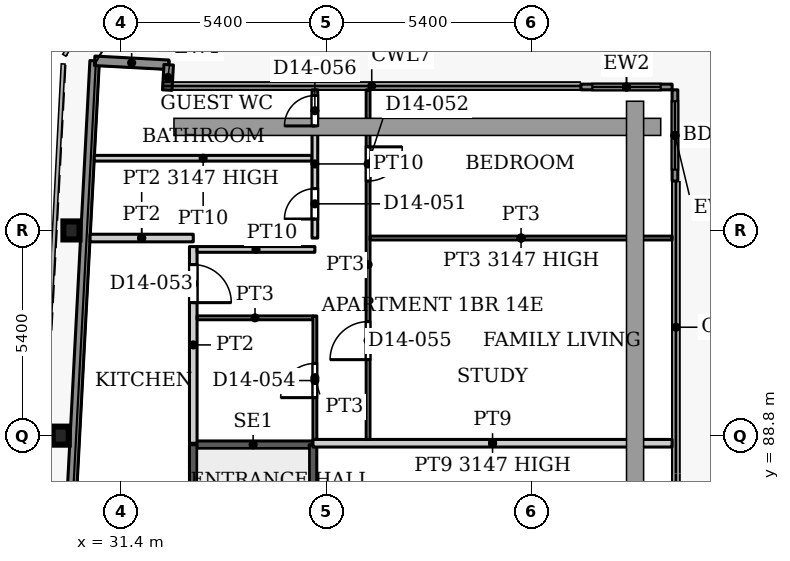
"""IFC4 building model, lengths in metres.
Left out: names, types, materials, properties, quantities, classifications, styles, units other than length and angle.
Written with IfcOpenShell. Run it as: python <this file> out.ifc"""

import sys

from ifc_helpers import new_model, si_unit, direction, frame, frame_2d, origin, origin_2d, place, context, subcontext, project, spatial, rectangle, i_section, extrude, source, transform, mapped, element, fill, save


model = new_model("IFC4")
c1 = context("Model", 3, precision=1e-05, world=origin(), true_north=direction((0.0, 1.0)))
c2 = subcontext(c1, "Body", "Model", "MODEL_VIEW")
j1 = project(units=[si_unit("LENGTHUNIT", "METRE"), si_unit("PLANEANGLEUNIT", "RADIAN")], contexts=[c1])
p1 = place(None, origin())
s1 = spatial("IfcSite", under=j1, at=p1, CompositionType="ELEMENT")
p2 = place(p1, origin())
s2 = spatial("IfcBuilding", under=s1, at=p2, CompositionType="ELEMENT")
p3 = place(p2, frame((0.0, 0.0, 61.7)))
s3 = spatial("IfcBuildingStorey", under=s2, at=p3, CompositionType="ELEMENT", Elevation=61.7)
for number, where, z_axis, x_axis in (
    (1, (29.811, 88.8, 0.0), (0.0, 0.0, 1.0), (1.0, 0.0, 0.0)),
    (2, (30.095, 94.2, 0.0), (0.0, 0.0, 1.0), (1.0, 0.0, 0.0)),
):
    element("IfcColumn", number, at=place(p3, frame(where, z_axis=z_axis, x_axis=x_axis)), inside=s3, PredefinedType="COLUMN", context=c2, shape_type="SweptSolid", body=[
        extrude(i_section(OverallWidth=0.424, OverallDepth=0.474, WebThickness=0.048, FlangeThickness=0.077, FilletRadius=0.014, at=origin_2d()), origin(), (0.0, 0.0, 1.0), 3.9),
    ])
p4 = place(p3, frame((27.195, 31.969, 0.0), z_axis=(0.0, 0.0, 1.0), x_axis=(0.052554995867, 0.998618031286, 0.0)))
e3 = element("IfcWall", 3, at=p4, inside=s3, PredefinedType="SOLIDWALL", context=c2, shape_type="SweptSolid", body=[
    extrude(rectangle(XDim=66.787, YDim=0.25, at=frame_2d((33.394, 0.0))), origin(), (0.0, 0.0, 1.0), 3.75),
])
p5 = place(p3, frame((30.705, 98.664, 0.0), z_axis=(0.0, 0.0, 1.0), x_axis=(0.998577785791, -0.053314216913, 0.0)))
e4 = element("IfcWall", 4, at=p5, inside=s3, PredefinedType="SOLIDWALL", context=c2, shape_type="SweptSolid", body=[
    extrude(rectangle(XDim=1.951, YDim=0.25, at=frame_2d((0.975, 0.0))), origin(), (0.0, 0.0, 1.0), 3.75),
])
p6 = place(p3, frame((32.653, 98.56, 0.0), z_axis=(0.0, 0.0, 1.0), x_axis=(-0.054093451632, -0.998535877418, 0.0)))
e5 = element("IfcWall", 5, at=p6, inside=s3, PredefinedType="SOLIDWALL", context=c2, shape_type="SweptSolid", body=[
    extrude(rectangle(XDim=0.668, YDim=0.25, at=frame_2d((0.334, 0.0))), origin(), (0.0, 0.0, 1.0), 3.75),
])
p7 = place(p3, frame((43.5, 97.975, 0.0), z_axis=(0.0, 0.0, 1.0), x_axis=(1.0, 0.0, 0.0)))
e6 = element("IfcWall", 6, at=p7, inside=s3, PredefinedType="SOLIDWALL", context=c2, shape_type="SweptSolid", body=[
    extrude(rectangle(XDim=2.4, YDim=0.15, at=frame_2d((1.2, 0.0))), origin(), (0.0, 0.0, 1.0), 3.75),
])
p8 = place(p7, frame((0.3, 0.0, 0.0)))
e7 = element("IfcOpeningElement", 7, at=p8, cuts=e6, PredefinedType="OPENING", context=c2, shape_type="SweptSolid", body=[
    extrude(rectangle(XDim=1.8, YDim=2.4, at=frame_2d((0.9, 1.2))), frame((0.0, 0.085, 0.0), z_axis=(0.0, -1.0, 0.0), x_axis=(1.0, 0.0, 0.0)), (0.0, 0.0, 1.0), 0.17),
])
p9 = place(p3, frame((45.975, 97.9, 0.0), z_axis=(0.0, 0.0, 1.0), x_axis=(0.0, -1.0, 0.0)))
e8 = element("IfcWall", 8, at=p9, inside=s3, PredefinedType="SOLIDWALL", context=c2, shape_type="SweptSolid", body=[
    extrude(rectangle(XDim=2.4, YDim=0.15, at=frame_2d((1.2, 0.0))), origin(), (0.0, 0.0, 1.0), 3.75),
])
p10 = place(p9, frame((0.3, 0.0, 0.0)))
e9 = element("IfcOpeningElement", 9, at=p10, cuts=e8, PredefinedType="OPENING", context=c2, shape_type="SweptSolid", body=[
    extrude(rectangle(XDim=1.8, YDim=2.4, at=frame_2d((0.9, 1.2))), frame((0.0, 0.085, 0.0), z_axis=(0.0, -1.0, 0.0), x_axis=(1.0, 0.0, 0.0)), (0.0, 0.0, 1.0), 0.17),
])
p11 = place(p3, frame((33.3, 88.56, 0.0), z_axis=(0.0, 0.0, 1.0), x_axis=(1.0, 0.0, 0.0)))
e10 = element("IfcWall", 10, at=p11, inside=s3, PredefinedType="SHEAR", context=c2, shape_type="SweptSolid", body=[
    extrude(rectangle(XDim=3.15, YDim=0.2, at=frame_2d((1.575, 0.0))), origin(), (0.0, 0.0, 1.0), 3.9),
])
p12 = place(p3, frame((33.3, 79.4, 0.0), z_axis=(0.0, 0.0, 1.0), x_axis=(0.0, 1.0, 0.0)))
e11 = element("IfcWall", 11, at=p12, inside=s3, PredefinedType="SHEAR", context=c2, shape_type="SweptSolid", body=[
    extrude(rectangle(XDim=9.16, YDim=0.2, at=frame_2d((4.58, 0.0))), origin(), (0.0, 0.0, 1.0), 3.9),
])
p13 = place(p12, frame((0.35, 0.0, 0.0)))
e12 = element("IfcOpeningElement", 12, at=p13, cuts=e11, PredefinedType="OPENING", context=c2, shape_type="SweptSolid", body=[
    extrude(rectangle(XDim=1.1, YDim=2.2, at=frame_2d((0.55, 1.1))), frame((0.0, 0.11, 0.0), z_axis=(0.0, -1.0, 0.0), x_axis=(1.0, 0.0, 0.0)), (0.0, 0.0, 1.0), 0.22),
])
p14 = place(p3, frame((36.45, 79.4, 0.0), z_axis=(0.0, 0.0, 1.0), x_axis=(0.0, 1.0, 0.0)))
e13 = element("IfcWall", 13, at=p14, inside=s3, PredefinedType="SHEAR", context=c2, shape_type="SweptSolid", body=[
    extrude(rectangle(XDim=9.16, YDim=0.2, at=frame_2d((4.58, 0.0))), origin(), (0.0, 0.0, 1.0), 3.9),
])
p15 = place(p3, frame((30.695, 96.1, 0.0), z_axis=(0.0, 0.0, 1.0), x_axis=(1.0, 0.0, 0.0)))
e14 = element("IfcWall", 14, at=p15, inside=s3, PredefinedType="PARTITIONING", context=c2, shape_type="SweptSolid", body=[
    extrude(rectangle(XDim=5.73, YDim=0.15, at=frame_2d((2.865, 0.0))), origin(), (0.0, 0.0, 1.0), 3.6),
])
p16 = place(p3, frame((30.585, 94.0, 0.0), z_axis=(0.0, 0.0, 1.0), x_axis=(1.0, 0.0, 0.0)))
e15 = element("IfcWall", 15, at=p16, inside=s3, PredefinedType="PARTITIONING", context=c2, shape_type="SweptSolid", body=[
    extrude(rectangle(XDim=2.715, YDim=0.2, at=frame_2d((1.358, 0.0))), origin(), (0.0, 0.0, 1.0), 3.147),
])
p17 = place(p3, frame((33.3, 88.6, 0.0), z_axis=(0.0, 0.0, 1.0), x_axis=(0.0, 1.0, 0.0)))
e16 = element("IfcWall", 16, at=p17, inside=s3, PredefinedType="PARTITIONING", context=c2, shape_type="SweptSolid", body=[
    extrude(rectangle(XDim=5.175, YDim=0.2, at=frame_2d((2.587, 0.0))), origin(), (0.0, 0.0, 1.0), 3.6),
])
p18 = place(p17, frame((3.7, 0.0, 0.0)))
e17 = element("IfcOpeningElement", 17, at=p18, cuts=e16, PredefinedType="OPENING", context=c2, shape_type="SweptSolid", body=[
    extrude(rectangle(XDim=1.0, YDim=2.1, at=frame_2d((0.5, 1.05))), frame((0.0, 0.11, 0.0), z_axis=(0.0, -1.0, 0.0), x_axis=(1.0, 0.0, 0.0)), (0.0, 0.0, 1.0), 0.22),
])
p19 = place(p3, frame((33.4, 91.9, 0.0), z_axis=(0.0, 0.0, 1.0), x_axis=(1.0, 0.0, 0.0)))
e18 = element("IfcWall", 18, at=p19, inside=s3, PredefinedType="PARTITIONING", context=c2, shape_type="SweptSolid", body=[
    extrude(rectangle(XDim=3.05, YDim=0.1, at=frame_2d((1.525, 0.0))), origin(), (0.0, 0.0, 1.0), 3.6),
])
p20 = place(p3, frame((33.4, 93.7, 0.0), z_axis=(0.0, 0.0, 1.0), x_axis=(1.0, 0.0, 0.0)))
e19 = element("IfcWall", 19, at=p20, inside=s3, PredefinedType="PARTITIONING", context=c2, shape_type="SweptSolid", body=[
    extrude(rectangle(XDim=3.1, YDim=0.15, at=frame_2d((1.55, 0.0))), origin(), (0.0, 0.0, 1.0), 3.6),
])
p21 = place(p3, frame((36.45, 88.6, 0.0), z_axis=(0.0, 0.0, 1.0), x_axis=(1.0, 0.0, 0.0)))
e20 = element("IfcWall", 20, at=p21, inside=s3, PredefinedType="PARTITIONING", context=c2, shape_type="SweptSolid", body=[
    extrude(rectangle(XDim=9.45, YDim=0.2, at=frame_2d((4.725, 0.0))), origin(), (0.0, 0.0, 1.0), 3.147),
])
p22 = place(p3, frame((36.5, 88.7, 0.0), z_axis=(0.0, 0.0, 1.0), x_axis=(0.0, 1.0, 0.0)))
e21 = element("IfcWall", 21, at=p22, inside=s3, PredefinedType="PARTITIONING", context=c2, shape_type="SweptSolid", body=[
    extrude(rectangle(XDim=3.25, YDim=0.1, at=frame_2d((1.625, 0.0))), origin(), (0.0, 0.0, 1.0), 3.6),
])
p23 = place(p22, frame((1.1, 0.0, 0.0)))
e22 = element("IfcOpeningElement", 22, at=p23, cuts=e21, PredefinedType="OPENING", context=c2, shape_type="SweptSolid", body=[
    extrude(rectangle(XDim=0.9, YDim=2.1, at=frame_2d((0.45, 1.05))), frame((0.0, 0.06, 0.0), z_axis=(0.0, -1.0, 0.0), x_axis=(1.0, 0.0, 0.0)), (0.0, 0.0, 1.0), 0.12),
])
p24 = place(p3, frame((36.5, 94.0, 0.0), z_axis=(0.0, 0.0, 1.0), x_axis=(0.0, 1.0, 0.0)))
e23 = element("IfcWall", 23, at=p24, inside=s3, PredefinedType="PARTITIONING", context=c2, shape_type="SweptSolid", body=[
    extrude(rectangle(XDim=3.9, YDim=0.15, at=frame_2d((1.95, 0.0))), origin(), (0.0, 0.0, 1.0), 3.6),
])
p25 = place(p24, frame((0.5, 0.0, 0.0)))
e24 = element("IfcOpeningElement", 24, at=p25, cuts=e23, PredefinedType="OPENING", context=c2, shape_type="SweptSolid", body=[
    extrude(rectangle(XDim=0.8, YDim=2.1, at=frame_2d((0.4, 1.05))), frame((0.0, 0.085, 0.0), z_axis=(0.0, -1.0, 0.0), x_axis=(1.0, 0.0, 0.0)), (0.0, 0.0, 1.0), 0.17),
])
p26 = place(p24, frame((2.95, 0.0, 0.0)))
e25 = element("IfcOpeningElement", 25, at=p26, cuts=e23, PredefinedType="OPENING", context=c2, shape_type="SweptSolid", body=[
    extrude(rectangle(XDim=0.8, YDim=2.1, at=frame_2d((0.4, 1.05))), frame((0.0, 0.085, 0.0), z_axis=(0.0, -1.0, 0.0), x_axis=(1.0, 0.0, 0.0)), (0.0, 0.0, 1.0), 0.17),
])
p27 = place(p3, frame((37.9, 88.7, 0.0), z_axis=(0.0, 0.0, 1.0), x_axis=(0.0, 1.0, 0.0)))
e26 = element("IfcWall", 26, at=p27, inside=s3, PredefinedType="PARTITIONING", context=c2, shape_type="SweptSolid", body=[
    extrude(rectangle(XDim=9.2, YDim=0.1, at=frame_2d((4.6, 0.0))), origin(), (0.0, 0.0, 1.0), 3.6),
])
p28 = place(p27, frame((6.8, 0.0, 0.0)))
e27 = element("IfcOpeningElement", 27, at=p28, cuts=e26, PredefinedType="OPENING", context=c2, shape_type="SweptSolid", body=[
    extrude(rectangle(XDim=0.9, YDim=2.1, at=frame_2d((0.45, 1.05))), frame((0.0, 0.06, 0.0), z_axis=(0.0, -1.0, 0.0), x_axis=(1.0, 0.0, 0.0)), (0.0, 0.0, 1.0), 0.12),
])
p29 = place(p27, frame((2.1, 0.0, 0.0)))
e28 = element("IfcOpeningElement", 28, at=p29, cuts=e26, PredefinedType="OPENING", context=c2, shape_type="SweptSolid", body=[
    extrude(rectangle(XDim=1.0, YDim=2.1, at=frame_2d((0.5, 1.05))), frame((0.0, 0.06, 0.0), z_axis=(0.0, -1.0, 0.0), x_axis=(1.0, 0.0, 0.0)), (0.0, 0.0, 1.0), 0.12),
])
p30 = place(p3, frame((37.95, 94.0, 0.0), z_axis=(0.0, 0.0, 1.0), x_axis=(1.0, 0.0, 0.0)))
e29 = element("IfcWall", 29, at=p30, inside=s3, PredefinedType="PARTITIONING", context=c2, shape_type="SweptSolid", body=[
    extrude(rectangle(XDim=7.95, YDim=0.1, at=frame_2d((3.975, 0.0))), origin(), (0.0, 0.0, 1.0), 3.147),
])
m1 = source(origin(), c2, "Body", "SweptSolid", [
    extrude(rectangle(XDim=1.8, YDim=2.4, at=frame_2d((0.9, 1.2))), frame((0.0, 0.025, 0.0), z_axis=(0.0, -1.0, 0.0), x_axis=(1.0, 0.0, 0.0)), (0.0, 0.0, 1.0), 0.05),
])
p31 = place(p8, origin())
e30 = element("IfcDoor", 30, at=p31, inside=s3, OperationType="SLIDING_TO_LEFT", PredefinedType="DOOR", context=c2, shape_type="MappedRepresentation", body=[
    mapped(m1, transform((0.0, 0.0, 0.0), x_axis=(1.0, 0.0, 0.0), y_axis=(0.0, 1.0, 0.0), z_axis=(0.0, 0.0, 1.0), scale=1.0)),
])
fill(e7, e30)
p32 = place(p10, origin())
e31 = element("IfcDoor", 31, at=p32, inside=s3, OperationType="SLIDING_TO_LEFT", PredefinedType="DOOR", context=c2, shape_type="MappedRepresentation", body=[
    mapped(m1, transform((0.0, 0.0, 0.0), x_axis=(1.0, 0.0, 0.0), y_axis=(0.0, 1.0, 0.0), z_axis=(0.0, 0.0, 1.0), scale=1.0)),
])
fill(e9, e31)
m2 = source(origin(), c2, "Body", "SweptSolid", [
    extrude(rectangle(XDim=0.8, YDim=2.1, at=frame_2d((0.4, 1.05))), frame((0.0, 0.025, 0.0), z_axis=(0.0, -1.0, 0.0), x_axis=(1.0, 0.0, 0.0)), (0.0, 0.0, 1.0), 0.05),
])
p33 = place(p25, origin())
e32 = element("IfcDoor", 32, at=p33, inside=s3, OperationType="SINGLE_SWING_LEFT", PredefinedType="DOOR", context=c2, shape_type="MappedRepresentation", body=[
    mapped(m2, transform((0.0, 0.0, 0.0), x_axis=(1.0, 0.0, 0.0), y_axis=(0.0, 1.0, 0.0), z_axis=(0.0, 0.0, 1.0), scale=1.0)),
])
fill(e24, e32)
m3 = source(origin(), c2, "Body", "SweptSolid", [
    extrude(rectangle(XDim=0.9, YDim=2.1, at=frame_2d((0.45, 1.05))), frame((0.0, 0.025, 0.0), z_axis=(0.0, -1.0, 0.0), x_axis=(1.0, 0.0, 0.0)), (0.0, 0.0, 1.0), 0.05),
])
p34 = place(p28, origin())
e33 = element("IfcDoor", 33, at=p34, inside=s3, OperationType="SINGLE_SWING_RIGHT", PredefinedType="DOOR", context=c2, shape_type="MappedRepresentation", body=[
    mapped(m3, transform((0.0, 0.0, 0.0), x_axis=(1.0, 0.0, 0.0), y_axis=(0.0, 1.0, 0.0), z_axis=(0.0, 0.0, 1.0), scale=1.0)),
])
fill(e27, e33)
m4 = source(origin(), c2, "Body", "SweptSolid", [
    extrude(rectangle(XDim=1.0, YDim=2.1, at=frame_2d((0.5, 1.05))), frame((0.0, 0.025, 0.0), z_axis=(0.0, -1.0, 0.0), x_axis=(1.0, 0.0, 0.0)), (0.0, 0.0, 1.0), 0.05),
])
p35 = place(p18, origin())
e34 = element("IfcDoor", 34, at=p35, inside=s3, OperationType="SINGLE_SWING_RIGHT", PredefinedType="DOOR", context=c2, shape_type="MappedRepresentation", body=[
    mapped(m4, transform((0.0, 0.0, 0.0), x_axis=(1.0, 0.0, 0.0), y_axis=(0.0, 1.0, 0.0), z_axis=(0.0, 0.0, 1.0), scale=1.0)),
])
fill(e17, e34)
p36 = place(p23, origin())
e35 = element("IfcDoor", 35, at=p36, inside=s3, OperationType="SINGLE_SWING_LEFT", PredefinedType="DOOR", context=c2, shape_type="MappedRepresentation", body=[
    mapped(m3, transform((0.0, 0.0, 0.0), x_axis=(1.0, 0.0, 0.0), y_axis=(0.0, 1.0, 0.0), z_axis=(0.0, 0.0, 1.0), scale=1.0)),
])
fill(e22, e35)
m5 = source(origin(), c2, "Body", "SweptSolid", [
    extrude(rectangle(XDim=1.0, YDim=2.1, at=frame_2d((0.5, 1.05))), frame((0.0, 0.025, 0.0), z_axis=(0.0, -1.0, 0.0), x_axis=(1.0, 0.0, 0.0)), (0.0, 0.0, 1.0), 0.05),
])
p37 = place(p29, origin())
e36 = element("IfcDoor", 36, at=p37, inside=s3, OperationType="SINGLE_SWING_LEFT", PredefinedType="DOOR", context=c2, shape_type="MappedRepresentation", body=[
    mapped(m5, transform((0.0, 0.0, 0.0), x_axis=(1.0, 0.0, 0.0), y_axis=(0.0, 1.0, 0.0), z_axis=(0.0, 0.0, 1.0), scale=1.0)),
])
fill(e28, e36)
p38 = place(p26, origin())
e37 = element("IfcDoor", 37, at=p38, inside=s3, OperationType="SINGLE_SWING_LEFT", PredefinedType="DOOR", context=c2, shape_type="MappedRepresentation", body=[
    mapped(m2, transform((0.0, 0.0, 0.0), x_axis=(1.0, 0.0, 0.0), y_axis=(0.0, 1.0, 0.0), z_axis=(0.0, 0.0, 1.0), scale=1.0)),
])
fill(e25, e37)
save(model, sys.argv[1])
